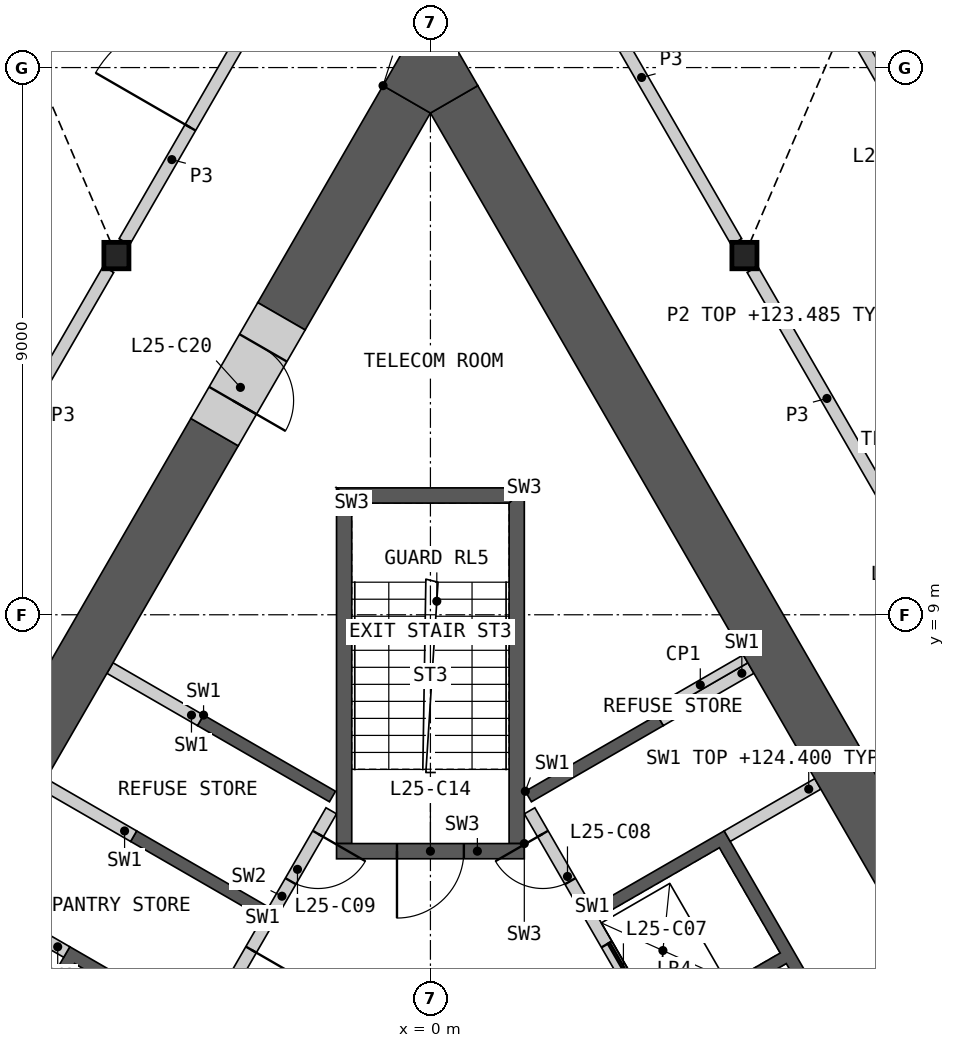
"""IFC4 building model, lengths in metres.
Left out: names, types, materials, properties, quantities, classifications, styles, units other than length and angle.
Written with IfcOpenShell. Run it as: python <this file> out.ifc"""

import sys

from ifc_helpers import new_model, si_unit, direction, frame, frame_2d, origin, origin_2d, place, context, subcontext, project, spatial, polyline, rectangle, i_section, outline, extrude, element, fill, save


model = new_model("IFC4")
c1 = context("Model", 3, precision=1e-05, world=origin(), true_north=direction((0.0, 1.0)))
c2 = subcontext(c1, "Body", "Model", "MODEL_VIEW")
j1 = project(units=[si_unit("LENGTHUNIT", "METRE"), si_unit("PLANEANGLEUNIT", "RADIAN")], contexts=[c1])
p1 = place(None, origin())
s1 = spatial("IfcSite", under=j1, at=p1, CompositionType="ELEMENT")
p2 = place(p1, origin())
s2 = spatial("IfcBuilding", under=s1, at=p2, CompositionType="ELEMENT")
p3 = place(p2, frame((0.0, 0.0, 120.6)))
s3 = spatial("IfcBuildingStorey", under=s2, at=p3, CompositionType="ELEMENT", Elevation=120.6)
for number, where, z_axis, x_axis in (
    (1, (-5.164, 14.908, 0.0), (0.0, 0.0, 1.0), (1.0, 0.0, 0.0)),
    (2, (5.164, 14.908, 0.0), (0.0, 0.0, 1.0), (1.0, 0.0, 0.0)),
):
    element("IfcColumn", number, at=place(p3, frame(where, z_axis=z_axis, x_axis=x_axis)), inside=s3, PredefinedType="COLUMN", context=c2, shape_type="SweptSolid", body=[
        extrude(i_section(OverallWidth=0.412, OverallDepth=0.435, WebThickness=0.036, FlangeThickness=0.057, at=origin_2d()), origin(), (0.0, 0.0, 1.0), 4.2),
    ])
p4 = place(p3, origin())
e3 = element("IfcWall", 3, at=p4, inside=s3, PredefinedType="SHEAR", context=c2, shape_type="SweptSolid", body=[
    extrude(outline(polyline([(1.561, 6.097), (3.731, 7.35), (3.831, 7.177), (1.66, 5.924), (1.561, 6.097)])), origin(), (0.0, 0.0, 1.0), 3.8),
])
p5 = place(p3, origin())
e4 = element("IfcWall", 4, at=p5, inside=s3, PredefinedType="SHEAR", context=c2, shape_type="SweptSolid", body=[
    extrude(outline(polyline([(2.66, 4.192), (4.831, 5.445), (8.231, -0.444), (6.061, -1.697), (5.96, -1.524), (7.952, -0.374), (6.952, 1.358), (4.96, 0.208), (4.861, 0.381), (6.852, 1.531), (5.852, 3.263), (3.861, 2.113), (3.76, 2.287), (5.752, 3.437), (4.752, 5.169), (2.76, 4.019), (2.66, 4.192)])), origin(), (0.0, 0.0, 1.0), 3.8),
])
p6 = place(p3, frame((5.817, -1.476, 0.0), z_axis=(0.0, 0.0, 1.0), x_axis=(-0.500002616675, 0.866023893041, 0.0)))
e5 = element("IfcWall", 5, at=p6, inside=s3, PredefinedType="SOLIDWALL", context=c2, shape_type="SweptSolid", body=[
    extrude(rectangle(XDim=8.373, YDim=0.2, at=frame_2d((4.187, 0.0))), origin(), (0.0, 0.0, 1.0), 3.8),
])
p7 = place(p6, frame((0.337, 0.0, 0.0)))
e6 = element("IfcOpeningElement", 6, at=p7, cuts=e5, PredefinedType="OPENING", context=c2, shape_type="SweptSolid", body=[
    extrude(rectangle(XDim=1.1, YDim=2.1, at=frame_2d((0.55, 1.05))), frame((0.0, 0.11, 0.0), z_axis=(0.0, -1.0, 0.0), x_axis=(1.0, 0.0, 0.0)), (0.0, 0.0, 1.0), 0.22),
])
p8 = place(p6, frame((2.537, 0.0, 0.0)))
e7 = element("IfcOpeningElement", 7, at=p8, cuts=e5, PredefinedType="OPENING", context=c2, shape_type="SweptSolid", body=[
    extrude(rectangle(XDim=1.1, YDim=2.1, at=frame_2d((0.55, 1.05))), frame((0.0, 0.11, 0.0), z_axis=(0.0, -1.0, 0.0), x_axis=(1.0, 0.0, 0.0)), (0.0, 0.0, 1.0), 0.22),
])
p9 = place(p6, frame((4.737, 0.0, 0.0)))
e8 = element("IfcOpeningElement", 8, at=p9, cuts=e5, PredefinedType="OPENING", context=c2, shape_type="SweptSolid", body=[
    extrude(rectangle(XDim=1.1, YDim=2.1, at=frame_2d((0.55, 1.05))), frame((0.0, 0.11, 0.0), z_axis=(0.0, -1.0, 0.0), x_axis=(1.0, 0.0, 0.0)), (0.0, 0.0, 1.0), 0.22),
])
p10 = place(p6, frame((7.037, 0.0, 0.0)))
e9 = element("IfcOpeningElement", 9, at=p10, cuts=e5, PredefinedType="OPENING", context=c2, shape_type="SweptSolid", body=[
    extrude(rectangle(XDim=0.9, YDim=2.1, at=frame_2d((0.45, 1.05))), frame((0.0, 0.11, 0.0), z_axis=(0.0, -1.0, 0.0), x_axis=(1.0, 0.0, 0.0)), (0.0, 0.0, 1.0), 0.22),
])
for number, where, z_axis, x_axis in (
    (10, (4.881, 5.358, 0.0), (0.0, 0.0, 1.0), (0.866, 0.5, 0.0)),
    (11, (3.781, 7.263, 0.0), (0.0, 0.0, 1.0), (0.866, 0.5, 0.0)),
):
    element("IfcWall", number, at=place(p3, frame(where, z_axis=z_axis, x_axis=x_axis)), inside=s3, PredefinedType="SHEAR", context=c2, shape_type="SweptSolid", body=[
        extrude(rectangle(XDim=1.72, YDim=0.2, at=frame_2d((0.86, 0.0))), origin(), (0.0, 0.0, 1.0), 3.8),
    ])
p11 = place(p3, origin())
e12 = element("IfcWall", 12, at=p11, inside=s3, PredefinedType="SHEAR", context=c2, shape_type="SweptSolid", body=[
    extrude(outline(polyline([(-4.96, 0.208), (-7.131, 1.461), (-5.931, 3.54), (-3.76, 2.287), (-3.861, 2.113), (-5.852, 3.263), (-6.852, 1.531), (-4.861, 0.381), (-4.96, 0.208)])), origin(), (0.0, 0.0, 1.0), 3.8),
])
p12 = place(p3, origin())
e13 = element("IfcWall", 13, at=p12, inside=s3, PredefinedType="SHEAR", context=c2, shape_type="SweptSolid", body=[
    extrude(outline(polyline([(-2.76, 4.019), (-4.931, 5.272), (-4.831, 5.445), (-2.66, 4.192), (-2.76, 4.019)])), origin(), (0.0, 0.0, 1.0), 3.8),
])
p13 = place(p3, origin())
e14 = element("IfcWall", 14, at=p13, inside=s3, PredefinedType="SHEAR", context=c2, shape_type="SweptSolid", body=[
    extrude(outline(polyline([(-3.731, 7.35), (-1.561, 6.097), (-1.66, 5.924), (-3.831, 7.177), (-3.731, 7.35)])), origin(), (0.0, 0.0, 1.0), 3.8),
])
p14 = place(p3, frame((-1.631, 5.776, 0.0), z_axis=(0.0, 0.0, 1.0), x_axis=(-0.499992876559, -0.866029516466, 0.0)))
e15 = element("IfcWall", 15, at=p14, inside=s3, PredefinedType="SOLIDWALL", context=c2, shape_type="SweptSolid", body=[
    extrude(rectangle(XDim=6.486, YDim=0.2, at=frame_2d((3.243, 0.0))), origin(), (0.0, 0.0, 1.0), 3.8),
])
p15 = place(p14, frame((0.437, 0.0, 0.0)))
e16 = element("IfcOpeningElement", 16, at=p15, cuts=e15, PredefinedType="OPENING", context=c2, shape_type="SweptSolid", body=[
    extrude(rectangle(XDim=0.9, YDim=2.1, at=frame_2d((0.45, 1.05))), frame((0.0, 0.11, 0.0), z_axis=(0.0, -1.0, 0.0), x_axis=(1.0, 0.0, 0.0)), (0.0, 0.0, 1.0), 0.22),
])
p16 = place(p14, frame((2.637, 0.0, 0.0)))
e17 = element("IfcOpeningElement", 17, at=p16, cuts=e15, PredefinedType="OPENING", context=c2, shape_type="SweptSolid", body=[
    extrude(rectangle(XDim=0.9, YDim=2.1, at=frame_2d((0.45, 1.05))), frame((0.0, 0.11, 0.0), z_axis=(0.0, -1.0, 0.0), x_axis=(1.0, 0.0, 0.0)), (0.0, 0.0, 1.0), 0.22),
])
for number, where, z_axis, x_axis in (
    (18, (-3.781, 7.263, 0.0), (0.0, 0.0, 1.0), (-0.866, 0.5, 0.0)),
    (19, (-4.881, 5.358, 0.0), (0.0, 0.0, 1.0), (-0.866, 0.5, 0.0)),
):
    element("IfcWall", number, at=place(p3, frame(where, z_axis=z_axis, x_axis=x_axis)), inside=s3, PredefinedType="SHEAR", context=c2, shape_type="SweptSolid", body=[
        extrude(rectangle(XDim=1.72, YDim=0.2, at=frame_2d((0.86, 0.0))), origin(), (0.0, 0.0, 1.0), 3.8),
    ])
p17 = place(p3, frame((-5.981, 3.453, 0.0), z_axis=(0.0, 0.0, 1.0), x_axis=(-0.866060346521, 0.499939472521, 0.0)))
e20 = element("IfcWall", 20, at=p17, inside=s3, PredefinedType="SHEAR", context=c2, shape_type="SweptSolid", body=[
    extrude(rectangle(XDim=1.72, YDim=0.2, at=frame_2d((0.86, 0.0))), origin(), (0.0, 0.0, 1.0), 3.8),
])
p18 = place(p3, origin())
e21 = element("IfcWall", 21, at=p18, inside=s3, PredefinedType="SHEAR", context=c2, shape_type="SweptSolid", body=[
    extrude(outline(polyline([(1.544, 5.237), (1.544, 11.087), (1.294, 10.837), (1.294, 5.237), (1.544, 5.237)])), origin(), (0.0, 0.0, 1.0), 3.8),
])
p19 = place(p3, origin())
e22 = element("IfcWall", 22, at=p19, inside=s3, PredefinedType="SHEAR", context=c2, shape_type="SweptSolid", body=[
    extrude(outline(polyline([(1.544, 11.087), (-1.544, 11.087), (-1.294, 10.837), (1.294, 10.837), (1.544, 11.087)])), origin(), (0.0, 0.0, 1.0), 3.8),
])
p20 = place(p3, origin())
e23 = element("IfcWall", 23, at=p20, inside=s3, PredefinedType="SHEAR", context=c2, shape_type="SweptSolid", body=[
    extrude(outline(polyline([(-1.294, 10.837), (-1.544, 11.087), (-1.544, 5.237), (-1.294, 5.237), (-1.294, 10.837)])), origin(), (0.0, 0.0, 1.0), 3.8),
])
p21 = place(p3, frame((1.544, 5.112, 0.0), z_axis=(0.0, 0.0, 1.0), x_axis=(-1.0, 0.0, 0.0)))
e24 = element("IfcWall", 24, at=p21, inside=s3, PredefinedType="SHEAR", context=c2, shape_type="SweptSolid", body=[
    extrude(rectangle(XDim=3.088, YDim=0.25, at=frame_2d((1.544, 0.0))), origin(), (0.0, 0.0, 1.0), 3.8),
])
p22 = place(p21, frame((0.994, 0.0, 0.0)))
e25 = element("IfcOpeningElement", 25, at=p22, cuts=e24, PredefinedType="OPENING", context=c2, shape_type="SweptSolid", body=[
    extrude(rectangle(XDim=1.1, YDim=2.1, at=frame_2d((0.55, 1.05))), frame((0.0, 0.135, 0.0), z_axis=(0.0, -1.0, 0.0), x_axis=(1.0, 0.0, 0.0)), (0.0, 0.0, 1.0), 0.27),
])
p23 = place(p3, frame((3.693, 7.415, 0.0), z_axis=(0.0, 0.0, 1.0), x_axis=(0.866024871741, 0.500000921525, 0.0)))
e26 = element("IfcWall", 26, at=p23, inside=s3, PredefinedType="PARTITIONING", context=c2, shape_type="SweptSolid", body=[
    extrude(rectangle(XDim=1.72, YDim=0.15, at=frame_2d((0.86, 0.0))), origin(), (0.0, 0.0, 1.0), 3.8),
])
p24 = place(p3, frame((7.91, 4.451, 0.0), z_axis=(0.0, 0.0, 1.0), x_axis=(-0.500005799286, 0.866022055539, 0.0)))
e27 = element("IfcWall", 27, at=p24, inside=s3, PredefinedType="SHEAR", context=c2, shape_type="SweptSolid", body=[
    extrude(rectangle(XDim=15.041, YDim=0.9, at=frame_2d((7.521, 0.0))), origin(), (0.0, 0.0, 1.0), 3.8),
])
p25 = place(p3, frame((-3.55, 12.004, 0.0), z_axis=(0.0, 0.0, 1.0), x_axis=(-0.499993245289, -0.866029303583, 0.0)))
e28 = element("IfcWall", 28, at=p25, inside=s3, PredefinedType="SHEAR", context=c2, shape_type="SweptSolid", body=[
    extrude(rectangle(XDim=8.741, YDim=0.9, at=frame_2d((4.37, 0.0))), origin(), (0.0, 0.0, 1.0), 3.8),
])
p26 = place(p3, frame((-0.39, 17.478, 0.0), z_axis=(0.0, 0.0, 1.0), x_axis=(-0.50001992892, -0.866013897511, 0.0)))
e29 = element("IfcWall", 29, at=p26, inside=s3, PredefinedType="SHEAR", context=c2, shape_type="SweptSolid", body=[
    extrude(rectangle(XDim=4.12, YDim=0.9, at=frame_2d((2.06, 0.0))), origin(), (0.0, 0.0, 1.0), 3.8),
])
p27 = place(p3, origin())
e30 = element("IfcWall", 30, at=p27, inside=s3, PredefinedType="SHEAR", context=c2, shape_type="SweptSolid", body=[
    extrude(outline(polyline([(-0.779, 17.703), (0.0, 19.052), (0.779, 17.703), (0.0, 17.253), (-0.779, 17.703)])), origin(), (0.0, 0.0, 1.0), 3.8),
])
p28 = place(p3, frame((-2.45, 13.909, 0.0), z_axis=(0.0, 0.0, 1.0), x_axis=(-0.50002983664, -0.866008176907, 0.0)))
e31 = element("IfcWall", 31, at=p28, inside=s3, PredefinedType="SHEAR", context=c2, shape_type="SweptSolid", body=[
    extrude(rectangle(XDim=2.2, YDim=0.9, at=frame_2d((1.1, 0.0))), origin(), (0.0, 0.0, 1.0), 3.8),
])
p29 = place(p28, frame((0.6, 0.0, 0.0)))
e32 = element("IfcOpeningElement", 32, at=p29, cuts=e31, PredefinedType="OPENING", context=c2, shape_type="SweptSolid", body=[
    extrude(rectangle(XDim=1.0, YDim=2.1, at=frame_2d((0.5, 1.05))), frame((0.0, 0.46, 0.0), z_axis=(0.0, -1.0, 0.0), x_axis=(1.0, 0.0, 0.0)), (0.0, 0.0, 1.0), 0.92),
])
p30 = place(p3, frame((-10.197, 6.19, 0.0), z_axis=(0.0, 0.0, 1.0), x_axis=(0.500012035596, 0.866018454918, 0.0)))
e33 = element("IfcWall", 33, at=p30, inside=s3, PredefinedType="PARTITIONING", context=c2, shape_type="SweptSolid", body=[
    extrude(rectangle(XDim=9.803, YDim=0.2, at=frame_2d((4.902, 0.0))), origin(), (0.0, 0.0, 1.0), 3.8),
])
p31 = place(p30, frame((1.851, 0.0, 0.0)))
e34 = element("IfcOpeningElement", 34, at=p31, cuts=e33, PredefinedType="OPENING", context=c2, shape_type="SweptSolid", body=[
    extrude(rectangle(XDim=1.0, YDim=2.1, at=frame_2d((0.5, 1.05))), frame((0.0, 0.11, 0.0), z_axis=(0.0, -1.0, 0.0), x_axis=(1.0, 0.0, 0.0)), (0.0, 0.0, 1.0), 0.22),
])
p32 = place(p3, frame((5.295, 14.68, 0.0), z_axis=(0.0, 0.0, 1.0), x_axis=(0.500012035596, -0.866018454918, 0.0)))
e35 = element("IfcWall", 35, at=p32, inside=s3, PredefinedType="PARTITIONING", context=c2, shape_type="SweptSolid", body=[
    extrude(rectangle(XDim=9.803, YDim=0.2, at=frame_2d((4.902, 0.0))), origin(), (0.0, 0.0, 1.0), 3.8),
])
p33 = place(p32, frame((4.376, 0.0, 0.0)))
e36 = element("IfcOpeningElement", 36, at=p33, cuts=e35, PredefinedType="OPENING", context=c2, shape_type="SweptSolid", body=[
    extrude(rectangle(XDim=0.95, YDim=2.1, at=frame_2d((0.475, 1.05))), frame((0.0, 0.11, 0.0), z_axis=(0.0, -1.0, 0.0), x_axis=(1.0, 0.0, 0.0)), (0.0, 0.0, 1.0), 0.22),
])
p34 = place(p3, frame((-5.033, 15.135, 0.0), z_axis=(0.0, 0.0, 1.0), x_axis=(0.499980978912, 0.866036385336, 0.0)))
e37 = element("IfcWall", 37, at=p34, inside=s3, PredefinedType="PARTITIONING", context=c2, shape_type="SweptSolid", body=[
    extrude(rectangle(XDim=6.24, YDim=0.2, at=frame_2d((3.12, 0.0))), origin(), (0.0, 0.0, 1.0), 3.8),
])
p35 = place(p34, frame((2.169, 0.0, 0.0)))
e38 = element("IfcOpeningElement", 38, at=p35, cuts=e37, PredefinedType="OPENING", context=c2, shape_type="SweptSolid", body=[
    extrude(rectangle(XDim=1.8, YDim=2.1, at=frame_2d((0.9, 1.05))), frame((0.0, 0.11, 0.0), z_axis=(0.0, -1.0, 0.0), x_axis=(1.0, 0.0, 0.0)), (0.0, 0.0, 1.0), 0.22),
])
p36 = place(p3, frame((1.913, 20.539, 0.0), z_axis=(0.0, 0.0, 1.0), x_axis=(0.499980978912, -0.866036385336, 0.0)))
e39 = element("IfcWall", 39, at=p36, inside=s3, PredefinedType="PARTITIONING", context=c2, shape_type="SweptSolid", body=[
    extrude(rectangle(XDim=6.24, YDim=0.2, at=frame_2d((3.12, 0.0))), origin(), (0.0, 0.0, 1.0), 3.8),
])
p37 = place(p3, frame((4.548, 22.775, 0.0), z_axis=(0.0, 0.0, 1.0), x_axis=(0.499999764473, -0.866025539766, 0.0)))
e40 = element("IfcWall", 40, at=p37, inside=s3, PredefinedType="PARTITIONING", context=c2, shape_type="SweptSolid", body=[
    extrude(rectangle(XDim=17.35, YDim=0.2, at=frame_2d((8.675, 0.0))), origin(), (0.0, 0.0, 1.0), 2.885),
])
p38 = place(p37, frame((7.65, 0.0, 0.0)))
e41 = element("IfcOpeningElement", 41, at=p38, cuts=e40, PredefinedType="OPENING", context=c2, shape_type="SweptSolid", body=[
    extrude(rectangle(XDim=0.95, YDim=2.1, at=frame_2d((0.475, 1.05))), frame((0.0, 0.11, 0.0), z_axis=(0.0, -1.0, 0.0), x_axis=(1.0, 0.0, 0.0)), (0.0, 0.0, 1.0), 0.22),
])
p39 = place(p9, origin())
e42 = element("IfcDoor", 42, at=p39, inside=s3, OperationType="SLIDING_TO_LEFT", PredefinedType="DOOR", context=c2, shape_type="SweptSolid", body=[
    extrude(rectangle(XDim=1.1, YDim=2.1, at=frame_2d((0.55, 1.05))), frame((0.0, 0.025, 0.0), z_axis=(0.0, -1.0, 0.0), x_axis=(1.0, 0.0, 0.0)), (0.0, 0.0, 1.0), 0.05),
])
fill(e8, e42)
p40 = place(p10, origin())
e43 = element("IfcDoor", 43, at=p40, inside=s3, OperationType="SINGLE_SWING_RIGHT", PredefinedType="DOOR", context=c2, shape_type="SweptSolid", body=[
    extrude(rectangle(XDim=0.9, YDim=2.1, at=frame_2d((0.45, 1.05))), frame((0.0, 0.025, 0.0), z_axis=(0.0, -1.0, 0.0), x_axis=(1.0, 0.0, 0.0)), (0.0, 0.0, 1.0), 0.05),
])
fill(e9, e43)
p41 = place(p15, origin())
e44 = element("IfcDoor", 44, at=p41, inside=s3, OperationType="SINGLE_SWING_LEFT", PredefinedType="DOOR", context=c2, shape_type="SweptSolid", body=[
    extrude(rectangle(XDim=0.9, YDim=2.1, at=frame_2d((0.45, 1.05))), frame((0.0, 0.025, 0.0), z_axis=(0.0, -1.0, 0.0), x_axis=(1.0, 0.0, 0.0)), (0.0, 0.0, 1.0), 0.05),
])
fill(e16, e44)
p42 = place(p16, origin())
e45 = element("IfcDoor", 45, at=p42, inside=s3, OperationType="SINGLE_SWING_LEFT", PredefinedType="DOOR", context=c2, shape_type="SweptSolid", body=[
    extrude(rectangle(XDim=0.9, YDim=2.1, at=frame_2d((0.45, 1.05))), frame((0.0, 0.025, 0.0), z_axis=(0.0, -1.0, 0.0), x_axis=(1.0, 0.0, 0.0)), (0.0, 0.0, 1.0), 0.05),
])
fill(e17, e45)
p43 = place(p22, origin())
e46 = element("IfcDoor", 46, at=p43, inside=s3, OperationType="SINGLE_SWING_RIGHT", PredefinedType="DOOR", context=c2, shape_type="SweptSolid", body=[
    extrude(rectangle(XDim=1.1, YDim=2.1, at=frame_2d((0.55, 1.05))), frame((0.0, 0.025, 0.0), z_axis=(0.0, -1.0, 0.0), x_axis=(1.0, 0.0, 0.0)), (0.0, 0.0, 1.0), 0.05),
])
fill(e25, e46)
p44 = place(p29, origin())
e47 = element("IfcDoor", 47, at=p44, inside=s3, OperationType="SINGLE_SWING_RIGHT", PredefinedType="DOOR", context=c2, shape_type="SweptSolid", body=[
    extrude(rectangle(XDim=1.0, YDim=2.1, at=frame_2d((0.5, 1.05))), frame((0.0, 0.205, 0.0), z_axis=(0.0, -1.0, 0.0), x_axis=(1.0, 0.0, 0.0)), (0.0, 0.0, 1.0), 0.05),
])
fill(e32, e47)
p45 = place(p35, origin())
e48 = element("IfcDoor", 48, at=p45, inside=s3, OperationType="DOUBLE_DOOR_SINGLE_SWING", PredefinedType="DOOR", context=c2, shape_type="SweptSolid", body=[
    extrude(rectangle(XDim=1.8, YDim=2.1, at=frame_2d((0.9, 1.05))), frame((0.0, 0.025, 0.0), z_axis=(0.0, -1.0, 0.0), x_axis=(1.0, 0.0, 0.0)), (0.0, 0.0, 1.0), 0.05),
])
fill(e38, e48)
save(model, sys.argv[1])
